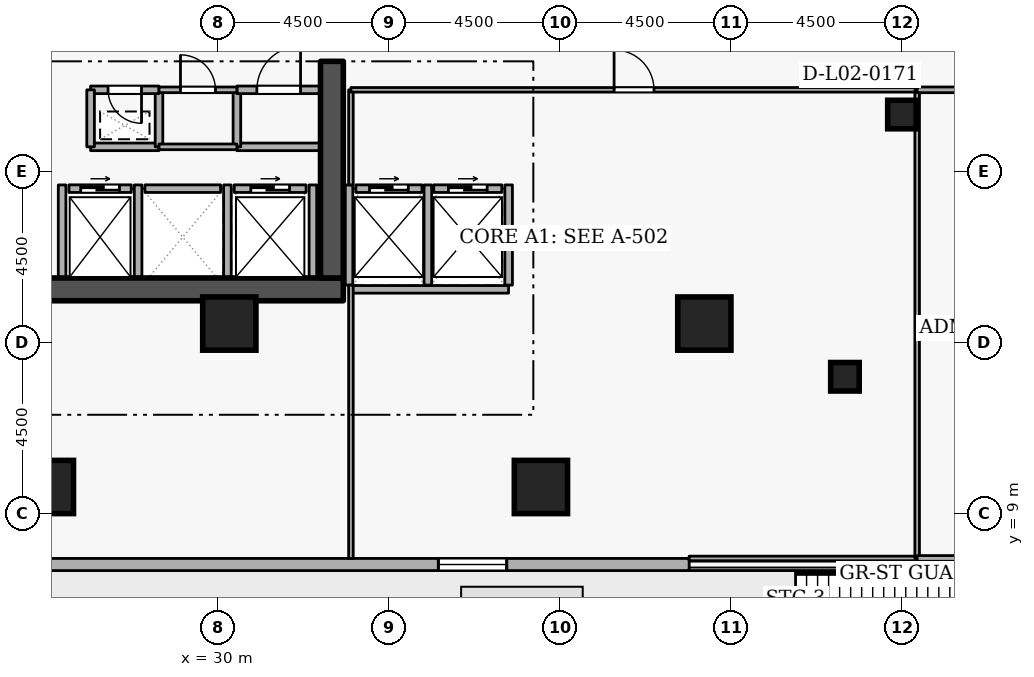
"""IFC4 building model, lengths in metres.
Left out: names, types, materials, properties, quantities, classifications, styles, units other than length and angle.
Written with IfcOpenShell. Run it as: python <this file> out.ifc"""

import sys

from ifc_helpers import new_model, si_unit, direction, frame, frame_2d, origin, origin_2d, place, context, subcontext, project, spatial, rectangle, extrude, element, fill, save


model = new_model("IFC4")
c1 = context("Model", 3, precision=1e-05, world=origin(), true_north=direction((0.0, 1.0)))
c2 = subcontext(c1, "Body", "Model", "MODEL_VIEW")
j1 = project(units=[si_unit("LENGTHUNIT", "METRE"), si_unit("PLANEANGLEUNIT", "RADIAN")], contexts=[c1])
p1 = place(None, origin())
s1 = spatial("IfcSite", under=j1, at=p1, CompositionType="ELEMENT")
p2 = place(p1, origin())
s2 = spatial("IfcBuilding", under=s1, at=p2, CompositionType="ELEMENT")
p3 = place(p2, frame((0.0, 0.0, 9.6)))
s3 = spatial("IfcBuildingStorey", under=s2, at=p3, CompositionType="ELEMENT", Elevation=9.6)
p4 = place(p3, frame((17.7, 14.9, 0.0), z_axis=(0.0, 0.0, 1.0), x_axis=(1.0, 0.0, 0.0)))
e1 = element("IfcWall", 1, at=p4, inside=s3, PredefinedType="SHEAR", context=c2, shape_type="SweptSolid", body=[
    extrude(rectangle(XDim=15.6, YDim=0.6, at=frame_2d((7.8, 0.0))), origin(), (0.0, 0.0, 1.0), 4.5),
])
p5 = place(p3, frame((33.0, 15.2, 0.0), z_axis=(0.0, 0.0, 1.0), x_axis=(0.0, 1.0, 0.0)))
e2 = element("IfcWall", 2, at=p5, inside=s3, PredefinedType="SHEAR", context=c2, shape_type="SweptSolid", body=[
    extrude(rectangle(XDim=5.7, YDim=0.6, at=frame_2d((2.85, 0.0))), origin(), (0.0, 0.0, 1.0), 4.5),
])
for number, where, z_axis, x_axis in (
    (3, (25.5, 9.7, 0.0), (0.0, 0.0, 1.0), (1.0, 0.0, 0.0)),
    (4, (38.5, 9.7, 0.0), (0.0, 0.0, 1.0), (1.0, 0.0, 0.0)),
    (5, (42.8, 14.0, 0.0), (0.0, 0.0, 1.0), (1.0, 0.0, 0.0)),
    (6, (30.3, 14.0, 0.0), (0.0, 0.0, 1.0), (1.0, 0.0, 0.0)),
):
    element("IfcColumn", number, at=place(p3, frame(where, z_axis=z_axis, x_axis=x_axis)), inside=s3, PredefinedType="COLUMN", context=c2, shape_type="SweptSolid", body=[
        extrude(rectangle(XDim=1.4, YDim=1.4, at=origin_2d()), origin(), (0.0, 0.0, 1.0), 4.5),
    ])
for number, where, z_axis, x_axis in (
    (7, (46.5, 12.6, 0.0), (0.0, 0.0, 1.0), (1.0, 0.0, 0.0)),
    (8, (48.0, 19.5, 0.0), (0.0, 0.0, 1.0), (1.0, 0.0, 0.0)),
):
    element("IfcColumn", number, at=place(p3, frame(where, z_axis=z_axis, x_axis=x_axis)), inside=s3, PredefinedType="COLUMN", context=c2, shape_type="SweptSolid", body=[
        extrude(rectangle(XDim=0.75, YDim=0.75, at=origin_2d()), origin(), (0.0, 0.0, 1.0), 4.5),
    ])
p6 = place(p3, frame((3.0, 7.66, 0.0), z_axis=(0.0, 0.0, 1.0), x_axis=(1.0, 0.0, 0.0)))
e9 = element("IfcWall", 9, at=p6, inside=s3, PredefinedType="STANDARD", context=c2, shape_type="SweptSolid", body=[
    extrude(rectangle(XDim=39.4, YDim=0.32, at=frame_2d((19.7, 0.0))), origin(), (0.0, 0.0, 1.0), 3.56),
])
p7 = place(p6, frame((6.2, 0.0, 0.0)))
e10 = element("IfcOpeningElement", 10, at=p7, cuts=e9, PredefinedType="OPENING", context=c2, shape_type="SweptSolid", body=[
    extrude(rectangle(XDim=1.15, YDim=2.1, at=frame_2d((0.575, 1.05))), frame((0.0, 0.17, 0.0), z_axis=(0.0, -1.0, 0.0), x_axis=(1.0, 0.0, 0.0)), (0.0, 0.0, 1.0), 0.34),
])
p8 = place(p6, frame((3.0, 0.0, 0.78)))
e11 = element("IfcOpeningElement", 11, at=p8, cuts=e9, PredefinedType="OPENING", context=c2, shape_type="SweptSolid", body=[
    extrude(rectangle(XDim=1.8, YDim=2.15, at=frame_2d((0.9, 1.075))), frame((0.0, 0.17, 0.0), z_axis=(0.0, -1.0, 0.0), x_axis=(1.0, 0.0, 0.0)), (0.0, 0.0, 1.0), 0.34),
])
p9 = place(p6, frame((12.8, 0.0, 0.78)))
e12 = element("IfcOpeningElement", 12, at=p9, cuts=e9, PredefinedType="OPENING", context=c2, shape_type="SweptSolid", body=[
    extrude(rectangle(XDim=1.8, YDim=2.15, at=frame_2d((0.9, 1.075))), frame((0.0, 0.17, 0.0), z_axis=(0.0, -1.0, 0.0), x_axis=(1.0, 0.0, 0.0)), (0.0, 0.0, 1.0), 0.34),
])
p10 = place(p6, frame((32.8, 0.0, 0.78)))
e13 = element("IfcOpeningElement", 13, at=p10, cuts=e9, PredefinedType="OPENING", context=c2, shape_type="SweptSolid", body=[
    extrude(rectangle(XDim=1.8, YDim=2.15, at=frame_2d((0.9, 1.075))), frame((0.0, 0.17, 0.0), z_axis=(0.0, -1.0, 0.0), x_axis=(1.0, 0.0, 0.0)), (0.0, 0.0, 1.0), 0.34),
])
p11 = place(p3, frame((26.08, 17.55, 0.0), z_axis=(0.0, 0.0, 1.0), x_axis=(1.0, 0.0, 0.0)))
e14 = element("IfcWall", 14, at=p11, inside=s3, PredefinedType="STANDARD", context=c2, shape_type="SweptSolid", body=[
    extrude(rectangle(XDim=1.64, YDim=0.2, at=frame_2d((0.82, 0.0))), origin(), (0.0, 0.0, 1.0), 4.16),
])
p12 = place(p11, frame((0.31, 0.0, 0.0)))
e15 = element("IfcOpeningElement", 15, at=p12, cuts=e14, PredefinedType="OPENING", context=c2, shape_type="SweptSolid", body=[
    extrude(rectangle(XDim=1.02, YDim=2.06, at=frame_2d((0.51, 1.03))), frame((0.0, 0.11, 0.0), z_axis=(0.0, -1.0, 0.0), x_axis=(1.0, 0.0, 0.0)), (0.0, 0.0, 1.0), 0.22),
])
p13 = place(p3, frame((28.08, 17.55, 0.0), z_axis=(0.0, 0.0, 1.0), x_axis=(1.0, 0.0, 0.0)))
e16 = element("IfcWall", 16, at=p13, inside=s3, PredefinedType="STANDARD", context=c2, shape_type="SweptSolid", body=[
    extrude(rectangle(XDim=1.99, YDim=0.2, at=frame_2d((0.995, 0.0))), origin(), (0.0, 0.0, 1.0), 4.16),
])
p14 = place(p3, frame((30.43, 17.55, 0.0), z_axis=(0.0, 0.0, 1.0), x_axis=(1.0, 0.0, 0.0)))
e17 = element("IfcWall", 17, at=p14, inside=s3, PredefinedType="STANDARD", context=c2, shape_type="SweptSolid", body=[
    extrude(rectangle(XDim=1.89, YDim=0.2, at=frame_2d((0.945, 0.0))), origin(), (0.0, 0.0, 1.0), 4.16),
])
p15 = place(p14, frame((0.435, 0.0, 0.0)))
e18 = element("IfcOpeningElement", 18, at=p15, cuts=e17, PredefinedType="OPENING", context=c2, shape_type="SweptSolid", body=[
    extrude(rectangle(XDim=1.02, YDim=2.06, at=frame_2d((0.51, 1.03))), frame((0.0, 0.11, 0.0), z_axis=(0.0, -1.0, 0.0), x_axis=(1.0, 0.0, 0.0)), (0.0, 0.0, 1.0), 0.22),
])
p16 = place(p3, frame((33.63, 17.55, 0.0), z_axis=(0.0, 0.0, 1.0), x_axis=(1.0, 0.0, 0.0)))
e19 = element("IfcWall", 19, at=p16, inside=s3, PredefinedType="STANDARD", context=c2, shape_type="SweptSolid", body=[
    extrude(rectangle(XDim=1.74, YDim=0.2, at=frame_2d((0.87, 0.0))), origin(), (0.0, 0.0, 1.0), 4.16),
])
p17 = place(p16, frame((0.36, 0.0, 0.0)))
e20 = element("IfcOpeningElement", 20, at=p17, cuts=e19, PredefinedType="OPENING", context=c2, shape_type="SweptSolid", body=[
    extrude(rectangle(XDim=1.02, YDim=2.06, at=frame_2d((0.51, 1.03))), frame((0.0, 0.11, 0.0), z_axis=(0.0, -1.0, 0.0), x_axis=(1.0, 0.0, 0.0)), (0.0, 0.0, 1.0), 0.22),
])
p18 = place(p3, frame((35.68, 17.55, 0.0), z_axis=(0.0, 0.0, 1.0), x_axis=(1.0, 0.0, 0.0)))
e21 = element("IfcWall", 21, at=p18, inside=s3, PredefinedType="STANDARD", context=c2, shape_type="SweptSolid", body=[
    extrude(rectangle(XDim=1.79, YDim=0.2, at=frame_2d((0.895, 0.0))), origin(), (0.0, 0.0, 1.0), 4.16),
])
p19 = place(p18, frame((0.385, 0.0, 0.0)))
e22 = element("IfcOpeningElement", 22, at=p19, cuts=e21, PredefinedType="OPENING", context=c2, shape_type="SweptSolid", body=[
    extrude(rectangle(XDim=1.02, YDim=2.06, at=frame_2d((0.51, 1.03))), frame((0.0, 0.11, 0.0), z_axis=(0.0, -1.0, 0.0), x_axis=(1.0, 0.0, 0.0)), (0.0, 0.0, 1.0), 0.22),
])
for number, where, z_axis, x_axis in (
    (23, (27.9, 15.212, 0.0), (0.0, 0.0, 1.0), (0.0, 1.0, 0.0)),
    (24, (25.9, 15.212, 0.0), (0.0, 0.0, 1.0), (0.0, 1.0, 0.0)),
    (25, (30.25, 15.212, 0.0), (0.0, 0.0, 1.0), (0.0, 1.0, 0.0)),
    (26, (32.5, 15.212, 0.0), (0.0, 0.0, 1.0), (0.0, 1.0, 0.0)),
):
    element("IfcWall", number, at=place(p3, frame(where, z_axis=z_axis, x_axis=x_axis)), inside=s3, PredefinedType="STANDARD", context=c2, shape_type="SweptSolid", body=[
        extrude(rectangle(XDim=2.436, YDim=0.2, at=frame_2d((1.218, 0.0))), origin(), (0.0, 0.0, 1.0), 4.16),
    ])
p20 = place(p3, frame((33.452, 14.9, 0.0), z_axis=(0.0, 0.0, 1.0), x_axis=(1.0, 0.0, 0.0)))
e27 = element("IfcWall", 27, at=p20, inside=s3, PredefinedType="STANDARD", context=c2, shape_type="SweptSolid", body=[
    extrude(rectangle(XDim=4.196, YDim=0.2, at=frame_2d((2.098, 0.0))), origin(), (0.0, 0.0, 1.0), 4.16),
])
for number, where, z_axis, x_axis in (
    (28, (35.525, 15.012, 0.0), (0.0, 0.0, 1.0), (0.0, 1.0, 0.0)),
    (29, (33.45, 15.012, 0.0), (0.0, 0.0, 1.0), (0.0, 1.0, 0.0)),
    (30, (37.65, 15.012, 0.0), (0.0, 0.0, 1.0), (0.0, 1.0, 0.0)),
):
    element("IfcWall", number, at=place(p3, frame(where, z_axis=z_axis, x_axis=x_axis)), inside=s3, PredefinedType="STANDARD", context=c2, shape_type="SweptSolid", body=[
        extrude(rectangle(XDim=2.636, YDim=0.2, at=frame_2d((1.318, 0.0))), origin(), (0.0, 0.0, 1.0), 4.16),
    ])
p21 = place(p3, frame((26.65, 18.65, 0.0), z_axis=(0.0, 0.0, 1.0), x_axis=(1.0, 0.0, 0.0)))
e31 = element("IfcWall", 31, at=p21, inside=s3, PredefinedType="STANDARD", context=c2, shape_type="SweptSolid", body=[
    extrude(rectangle(XDim=1.8, YDim=0.2, at=frame_2d((0.9, 0.0))), origin(), (0.0, 0.0, 1.0), 4.16),
])
p22 = place(p3, frame((28.45, 18.65, 0.0), z_axis=(0.0, 0.0, 1.0), x_axis=(0.0, 1.0, 0.0)))
e32 = element("IfcWall", 32, at=p22, inside=s3, PredefinedType="STANDARD", context=c2, shape_type="SweptSolid", body=[
    extrude(rectangle(XDim=1.5, YDim=0.2, at=frame_2d((0.75, 0.0))), origin(), (0.0, 0.0, 1.0), 4.16),
])
p23 = place(p3, frame((28.45, 20.15, 0.0), z_axis=(0.0, 0.0, 1.0), x_axis=(-1.0, 0.0, 0.0)))
e33 = element("IfcWall", 33, at=p23, inside=s3, PredefinedType="STANDARD", context=c2, shape_type="SweptSolid", body=[
    extrude(rectangle(XDim=1.8, YDim=0.2, at=frame_2d((0.9, 0.0))), origin(), (0.0, 0.0, 1.0), 4.16),
])
p24 = place(p23, frame((0.46, 0.0, 0.0)))
e34 = element("IfcOpeningElement", 34, at=p24, cuts=e33, PredefinedType="OPENING", context=c2, shape_type="SweptSolid", body=[
    extrude(rectangle(XDim=0.88, YDim=2.04, at=frame_2d((0.44, 1.02))), frame((0.0, 0.11, 0.0), z_axis=(0.0, -1.0, 0.0), x_axis=(1.0, 0.0, 0.0)), (0.0, 0.0, 1.0), 0.22),
])
p25 = place(p3, frame((26.65, 20.15, 0.0), z_axis=(0.0, 0.0, 1.0), x_axis=(0.0, -1.0, 0.0)))
e35 = element("IfcWall", 35, at=p25, inside=s3, PredefinedType="STANDARD", context=c2, shape_type="SweptSolid", body=[
    extrude(rectangle(XDim=1.5, YDim=0.2, at=frame_2d((0.75, 0.0))), origin(), (0.0, 0.0, 1.0), 4.16),
])
p26 = place(p3, frame((32.7, 18.65, 0.0), z_axis=(0.0, 0.0, 1.0), x_axis=(-1.0, 0.0, 0.0)))
e36 = element("IfcWall", 36, at=p26, inside=s3, PredefinedType="STANDARD", context=c2, shape_type="SweptSolid", body=[
    extrude(rectangle(XDim=2.2, YDim=0.2, at=frame_2d((1.1, 0.0))), origin(), (0.0, 0.0, 1.0), 4.16),
])
p27 = place(p3, frame((30.5, 18.65, 0.0), z_axis=(0.0, 0.0, 1.0), x_axis=(0.0, 1.0, 0.0)))
e37 = element("IfcWall", 37, at=p27, inside=s3, PredefinedType="STANDARD", context=c2, shape_type="SweptSolid", body=[
    extrude(rectangle(XDim=1.5, YDim=0.2, at=frame_2d((0.75, 0.0))), origin(), (0.0, 0.0, 1.0), 4.16),
])
p28 = place(p3, frame((30.5, 20.15, 0.0), z_axis=(0.0, 0.0, 1.0), x_axis=(1.0, 0.0, 0.0)))
e38 = element("IfcWall", 38, at=p28, inside=s3, PredefinedType="STANDARD", context=c2, shape_type="SweptSolid", body=[
    extrude(rectangle(XDim=2.2, YDim=0.2, at=frame_2d((1.1, 0.0))), origin(), (0.0, 0.0, 1.0), 4.16),
])
p29 = place(p28, frame((0.525, 0.0, 0.0)))
e39 = element("IfcOpeningElement", 39, at=p29, cuts=e38, PredefinedType="OPENING", context=c2, shape_type="SweptSolid", body=[
    extrude(rectangle(XDim=1.15, YDim=2.1, at=frame_2d((0.575, 1.05))), frame((0.0, 0.11, 0.0), z_axis=(0.0, -1.0, 0.0), x_axis=(1.0, 0.0, 0.0)), (0.0, 0.0, 1.0), 0.22),
])
p30 = place(p3, frame((30.5, 18.65, 0.0), z_axis=(0.0, 0.0, 1.0), x_axis=(-1.0, 0.0, 0.0)))
e40 = element("IfcWall", 40, at=p30, inside=s3, PredefinedType="PARTITIONING", context=c2, shape_type="SweptSolid", body=[
    extrude(rectangle(XDim=2.05, YDim=0.15, at=frame_2d((1.025, 0.0))), origin(), (0.0, 0.0, 1.0), 4.16),
])
p31 = place(p3, frame((28.45, 20.15, 0.0), z_axis=(0.0, 0.0, 1.0), x_axis=(1.0, 0.0, 0.0)))
e41 = element("IfcWall", 41, at=p31, inside=s3, PredefinedType="PARTITIONING", context=c2, shape_type="SweptSolid", body=[
    extrude(rectangle(XDim=2.05, YDim=0.15, at=frame_2d((1.025, 0.0))), origin(), (0.0, 0.0, 1.0), 4.16),
])
p32 = place(p31, frame((0.565, 0.0, 0.0)))
e42 = element("IfcOpeningElement", 42, at=p32, cuts=e41, PredefinedType="OPENING", context=c2, shape_type="SweptSolid", body=[
    extrude(rectangle(XDim=0.92, YDim=2.08, at=frame_2d((0.46, 1.04))), frame((0.0, 0.085, 0.0), z_axis=(0.0, -1.0, 0.0), x_axis=(1.0, 0.0, 0.0)), (0.0, 0.0, 1.0), 0.17),
])
p33 = place(p3, frame((48.4, 7.82, 0.0), z_axis=(0.0, 0.0, 1.0), x_axis=(-1.0, 0.0, 0.0)))
e43 = element("IfcWall", 43, at=p33, inside=s3, PredefinedType="PARTITIONING", context=c2, shape_type="SweptSolid", body=[
    extrude(rectangle(XDim=6.0, YDim=0.12, at=frame_2d((3.0, 0.0))), origin(), (0.0, 0.0, 1.0), 4.16),
])
p34 = place(p3, frame((33.5, 7.82, 0.0), z_axis=(0.0, 0.0, 1.0), x_axis=(0.0, 1.0, 0.0)))
e44 = element("IfcWall", 44, at=p34, inside=s3, PredefinedType="PARTITIONING", context=c2, shape_type="SweptSolid", body=[
    extrude(rectangle(XDim=7.192, YDim=0.12, at=frame_2d((3.596, 0.0))), origin(), (0.0, 0.0, 1.0), 4.16),
])
p35 = place(p3, frame((33.5, 17.648, 0.0), z_axis=(0.0, 0.0, 1.0), x_axis=(0.0, 1.0, 0.0)))
e45 = element("IfcWall", 45, at=p35, inside=s3, PredefinedType="PARTITIONING", context=c2, shape_type="SweptSolid", body=[
    extrude(rectangle(XDim=2.502, YDim=0.12, at=frame_2d((1.251, 0.0))), origin(), (0.0, 0.0, 1.0), 4.16),
])
p36 = place(p3, frame((33.5, 20.15, 0.0), z_axis=(0.0, 0.0, 1.0), x_axis=(1.0, 0.0, 0.0)))
e46 = element("IfcWall", 46, at=p36, inside=s3, PredefinedType="PARTITIONING", context=c2, shape_type="SweptSolid", body=[
    extrude(rectangle(XDim=14.9, YDim=0.12, at=frame_2d((7.45, 0.0))), origin(), (0.0, 0.0, 1.0), 4.16),
])
p37 = place(p36, frame((6.925, 0.0, 0.0)))
e47 = element("IfcOpeningElement", 47, at=p37, cuts=e46, PredefinedType="OPENING", context=c2, shape_type="SweptSolid", body=[
    extrude(rectangle(XDim=1.05, YDim=2.1, at=frame_2d((0.525, 1.05))), frame((0.0, 0.07, 0.0), z_axis=(0.0, -1.0, 0.0), x_axis=(1.0, 0.0, 0.0)), (0.0, 0.0, 1.0), 0.14),
])
p38 = place(p3, frame((48.4, 20.15, 0.0), z_axis=(0.0, 0.0, 1.0), x_axis=(0.0, -1.0, 0.0)))
e48 = element("IfcWall", 48, at=p38, inside=s3, PredefinedType="PARTITIONING", context=c2, shape_type="SweptSolid", body=[
    extrude(rectangle(XDim=12.33, YDim=0.12, at=frame_2d((6.165, 0.0))), origin(), (0.0, 0.0, 1.0), 4.16),
])
p39 = place(p3, frame((71.6, 7.82, 0.0), z_axis=(0.0, 0.0, 1.0), x_axis=(-1.0, 0.0, 0.0)))
e49 = element("IfcWall", 49, at=p39, inside=s3, PredefinedType="PARTITIONING", context=c2, shape_type="SweptSolid", body=[
    extrude(rectangle(XDim=23.2, YDim=0.15, at=frame_2d((11.6, 0.0))), origin(), (0.0, 0.0, 1.0), 4.16),
])
p40 = place(p3, frame((48.4, 20.15, 0.0), z_axis=(0.0, 0.0, 1.0), x_axis=(1.0, 0.0, 0.0)))
e50 = element("IfcWall", 50, at=p40, inside=s3, PredefinedType="PARTITIONING", context=c2, shape_type="SweptSolid", body=[
    extrude(rectangle(XDim=23.65, YDim=0.15, at=frame_2d((11.825, 0.0))), origin(), (0.0, 0.0, 1.0), 4.16),
])
p41 = place(p40, frame((11.175, 0.0, 0.0)))
e51 = element("IfcOpeningElement", 51, at=p41, cuts=e50, PredefinedType="OPENING", context=c2, shape_type="SweptSolid", body=[
    extrude(rectangle(XDim=1.3, YDim=2.12, at=frame_2d((0.65, 1.06))), frame((0.0, 0.085, 0.0), z_axis=(0.0, -1.0, 0.0), x_axis=(1.0, 0.0, 0.0)), (0.0, 0.0, 1.0), 0.17),
])
p42 = place(p10, origin())
e52 = element("IfcWindow", 52, at=p42, inside=s3, PartitioningType="SINGLE_PANEL", PredefinedType="WINDOW", context=c2, shape_type="SweptSolid", body=[
    extrude(rectangle(XDim=1.8, YDim=2.15, at=frame_2d((0.9, 1.075))), frame((0.0, 0.03, 0.0), z_axis=(0.0, -1.0, 0.0), x_axis=(1.0, 0.0, 0.0)), (0.0, 0.0, 1.0), 0.06),
])
fill(e13, e52)
p43 = place(p12, origin())
e53 = element("IfcDoor", 53, at=p43, inside=s3, OperationType="SLIDING_TO_LEFT", PredefinedType="DOOR", context=c2, shape_type="SweptSolid", body=[
    extrude(rectangle(XDim=1.02, YDim=2.06, at=frame_2d((0.51, 1.03))), frame((0.0, 0.025, 0.0), z_axis=(0.0, -1.0, 0.0), x_axis=(1.0, 0.0, 0.0)), (0.0, 0.0, 1.0), 0.05),
])
fill(e15, e53)
p44 = place(p15, origin())
e54 = element("IfcDoor", 54, at=p44, inside=s3, OperationType="SLIDING_TO_LEFT", PredefinedType="DOOR", context=c2, shape_type="SweptSolid", body=[
    extrude(rectangle(XDim=1.02, YDim=2.06, at=frame_2d((0.51, 1.03))), frame((0.0, 0.025, 0.0), z_axis=(0.0, -1.0, 0.0), x_axis=(1.0, 0.0, 0.0)), (0.0, 0.0, 1.0), 0.05),
])
fill(e18, e54)
p45 = place(p17, origin())
e55 = element("IfcDoor", 55, at=p45, inside=s3, OperationType="SLIDING_TO_LEFT", PredefinedType="DOOR", context=c2, shape_type="SweptSolid", body=[
    extrude(rectangle(XDim=1.02, YDim=2.06, at=frame_2d((0.51, 1.03))), frame((0.0, 0.025, 0.0), z_axis=(0.0, -1.0, 0.0), x_axis=(1.0, 0.0, 0.0)), (0.0, 0.0, 1.0), 0.05),
])
fill(e20, e55)
p46 = place(p19, origin())
e56 = element("IfcDoor", 56, at=p46, inside=s3, OperationType="SLIDING_TO_LEFT", PredefinedType="DOOR", context=c2, shape_type="SweptSolid", body=[
    extrude(rectangle(XDim=1.02, YDim=2.06, at=frame_2d((0.51, 1.03))), frame((0.0, 0.025, 0.0), z_axis=(0.0, -1.0, 0.0), x_axis=(1.0, 0.0, 0.0)), (0.0, 0.0, 1.0), 0.05),
])
fill(e22, e56)
p47 = place(p24, origin())
e57 = element("IfcDoor", 57, at=p47, inside=s3, OperationType="SINGLE_SWING_LEFT", PredefinedType="DOOR", context=c2, shape_type="SweptSolid", body=[
    extrude(rectangle(XDim=0.88, YDim=2.04, at=frame_2d((0.44, 1.02))), frame((0.0, 0.025, 0.0), z_axis=(0.0, -1.0, 0.0), x_axis=(1.0, 0.0, 0.0)), (0.0, 0.0, 1.0), 0.05),
])
fill(e34, e57)
p48 = place(p32, origin())
e58 = element("IfcDoor", 58, at=p48, inside=s3, OperationType="SINGLE_SWING_LEFT", PredefinedType="DOOR", context=c2, shape_type="SweptSolid", body=[
    extrude(rectangle(XDim=0.92, YDim=2.08, at=frame_2d((0.46, 1.04))), frame((0.0, 0.025, 0.0), z_axis=(0.0, -1.0, 0.0), x_axis=(1.0, 0.0, 0.0)), (0.0, 0.0, 1.0), 0.05),
])
fill(e42, e58)
p49 = place(p29, origin())
e59 = element("IfcDoor", 59, at=p49, inside=s3, OperationType="SINGLE_SWING_RIGHT", PredefinedType="DOOR", context=c2, shape_type="SweptSolid", body=[
    extrude(rectangle(XDim=1.15, YDim=2.1, at=frame_2d((0.575, 1.05))), frame((0.0, 0.025, 0.0), z_axis=(0.0, -1.0, 0.0), x_axis=(1.0, 0.0, 0.0)), (0.0, 0.0, 1.0), 0.05),
])
fill(e39, e59)
p50 = place(p37, origin())
e60 = element("IfcDoor", 60, at=p50, inside=s3, OperationType="SINGLE_SWING_LEFT", PredefinedType="DOOR", context=c2, shape_type="SweptSolid", body=[
    extrude(rectangle(XDim=1.05, YDim=2.1, at=frame_2d((0.525, 1.05))), frame((0.0, 0.025, 0.0), z_axis=(0.0, -1.0, 0.0), x_axis=(1.0, 0.0, 0.0)), (0.0, 0.0, 1.0), 0.05),
])
fill(e47, e60)
save(model, sys.argv[1])
